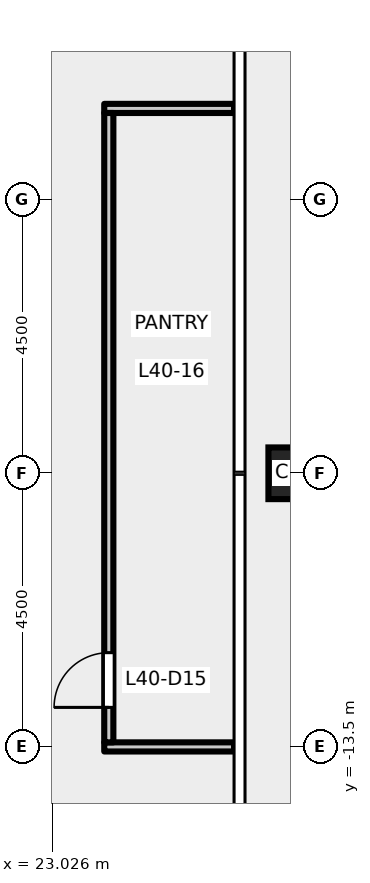
"""IFC4 building model, lengths in metres.
Left out: names, types, materials, properties, quantities, classifications, styles, units other than length and angle.
Written with IfcOpenShell. Run it as: python <this file> out.ifc"""

import sys

from ifc_helpers import new_model, si_unit, direction, frame, frame_2d, origin, origin_2d, place, context, subcontext, project, spatial, rectangle, hollow_rectangle, extrude, element, fill, save


model = new_model("IFC4")
c1 = context("Model", 3, precision=1e-05, world=origin(), true_north=direction((0.0, 1.0)))
c2 = subcontext(c1, "Body", "Model", "MODEL_VIEW")
j1 = project(units=[si_unit("LENGTHUNIT", "METRE"), si_unit("PLANEANGLEUNIT", "RADIAN")], contexts=[c1])
p1 = place(None, origin())
s1 = spatial("IfcSite", under=j1, at=p1, CompositionType="ELEMENT")
p2 = place(p1, origin())
s2 = spatial("IfcBuilding", under=s1, at=p2, CompositionType="ELEMENT")
p3 = place(p2, frame((0.0, 0.0, 187.2)))
s3 = spatial("IfcBuildingStorey", under=s2, at=p3, CompositionType="ELEMENT", Elevation=187.2)
p4 = place(p3, frame((27.0, -9.0, -0.2), z_axis=(0.0, 0.0, 1.0), x_axis=(1.0, 0.0, 0.0)))
e1 = element("IfcColumn", 1, at=p4, inside=s3, PredefinedType="COLUMN", context=c2, shape_type="SweptSolid", body=[
    extrude(hollow_rectangle(XDim=0.85, YDim=0.85, WallThickness=0.05, at=origin_2d()), origin(), (0.0, 0.0, 1.0), 5.7),
])
p5 = place(p3, frame((23.875, -13.5, 0.0), z_axis=(0.0, 0.0, 1.0), x_axis=(1.0, 0.0, 0.0)))
e2 = element("IfcWall", 2, at=p5, inside=s3, PredefinedType="PARTITIONING", context=c2, shape_type="SweptSolid", body=[
    extrude(rectangle(XDim=2.135, YDim=0.15, at=frame_2d((1.067, 0.0))), origin(), (0.0, 0.0, 1.0), 4.95),
])
p6 = place(p3, frame((23.875, -3.0, 0.0), z_axis=(0.0, 0.0, 1.0), x_axis=(1.0, 0.0, 0.0)))
e3 = element("IfcWall", 3, at=p6, inside=s3, PredefinedType="PARTITIONING", context=c2, shape_type="SweptSolid", body=[
    extrude(rectangle(XDim=2.135, YDim=0.15, at=frame_2d((1.067, 0.0))), origin(), (0.0, 0.0, 1.0), 5.35),
])
p7 = place(p3, frame((23.95, -13.425, 0.0), z_axis=(0.0, 0.0, 1.0), x_axis=(0.0, 1.0, 0.0)))
e4 = element("IfcWall", 4, at=p7, inside=s3, PredefinedType="PARTITIONING", context=c2, shape_type="SweptSolid", body=[
    extrude(rectangle(XDim=10.35, YDim=0.15, at=frame_2d((5.175, 0.0))), origin(), (0.0, 0.0, 1.0), 5.35),
])
p8 = place(p7, frame((0.575, 0.0, 0.0)))
e5 = element("IfcOpeningElement", 5, at=p8, cuts=e4, PredefinedType="OPENING", context=c2, shape_type="SweptSolid", body=[
    extrude(rectangle(XDim=0.9, YDim=2.1, at=frame_2d((0.45, 1.05))), frame((0.0, 0.085, 0.0), z_axis=(0.0, -1.0, 0.0), x_axis=(1.0, 0.0, 0.0)), (0.0, 0.0, 1.0), 0.17),
])
p9 = place(p8, origin())
e6 = element("IfcDoor", 6, at=p9, inside=s3, OperationType="SINGLE_SWING_LEFT", PredefinedType="DOOR", context=c2, shape_type="SweptSolid", body=[
    extrude(rectangle(XDim=0.9, YDim=2.1, at=frame_2d((0.45, 1.05))), frame((0.0, 0.025, 0.0), z_axis=(0.0, -1.0, 0.0), x_axis=(1.0, 0.0, 0.0)), (0.0, 0.0, 1.0), 0.05),
])
fill(e5, e6)
save(model, sys.argv[1])
